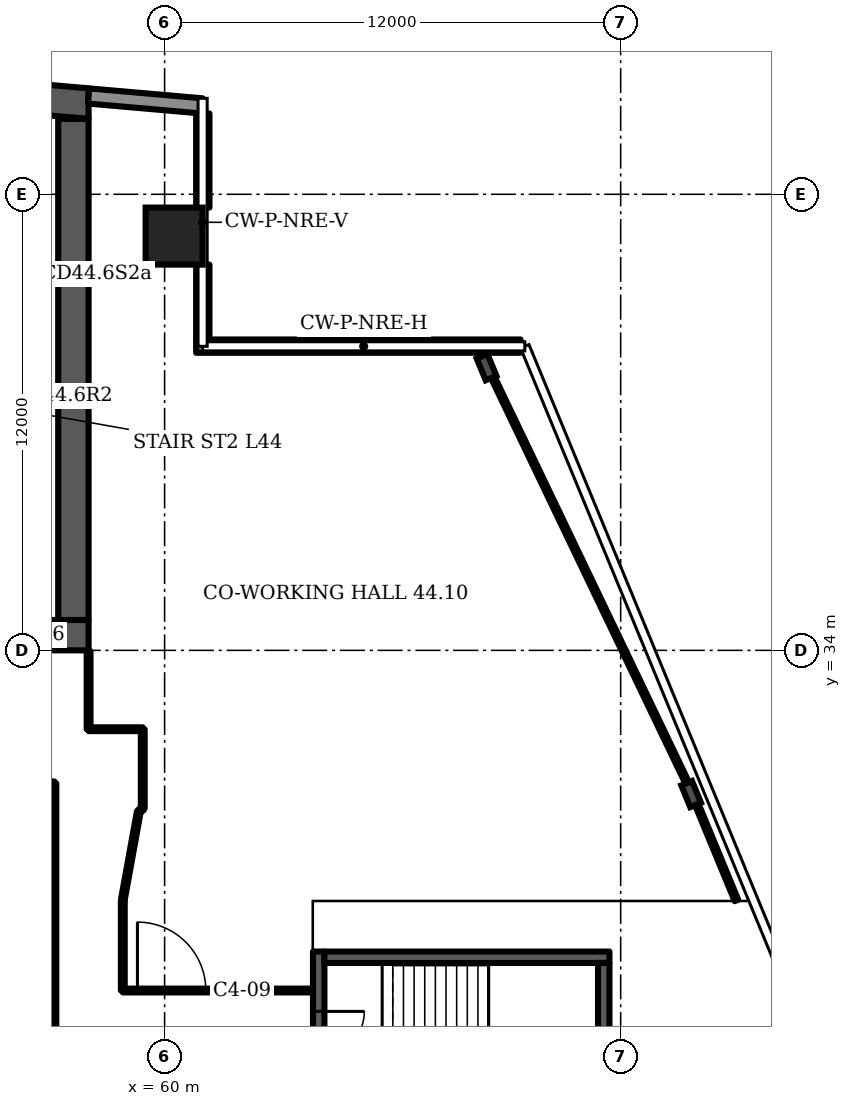
"""IFC4 building model, lengths in metres.
Left out: names, types, materials, properties, quantities, classifications, styles, units other than length and angle.
Written with IfcOpenShell. Run it as: python <this file> out.ifc"""

import sys

from ifc_helpers import new_model, si_unit, direction, frame, frame_2d, origin, origin_2d, place, context, subcontext, project, spatial, polyline, rectangle, i_section, outline, extrude, element, fill, save


model = new_model("IFC4")
c1 = context("Model", 3, precision=1e-05, world=origin(), true_north=direction((0.0, 1.0)))
c2 = subcontext(c1, "Body", "Model", "MODEL_VIEW")
j1 = project(units=[si_unit("LENGTHUNIT", "METRE"), si_unit("PLANEANGLEUNIT", "RADIAN")], contexts=[c1])
p1 = place(None, origin())
s1 = spatial("IfcSite", under=j1, at=p1, CompositionType="ELEMENT")
p2 = place(p1, origin())
s2 = spatial("IfcBuilding", under=s1, at=p2, CompositionType="ELEMENT")
p3 = place(p2, frame((0.0, 0.0, 180.7)))
s3 = spatial("IfcBuildingStorey", under=s2, at=p3, CompositionType="ELEMENT", Elevation=180.7)
p4 = place(p3, origin())
e1 = element("IfcWall", 1, at=p4, inside=s3, PredefinedType="SHEAR", context=c2, shape_type="SweptSolid", body=[
    extrude(outline(polyline([(16.0, 47.984), (37.0, 49.822), (58.0, 47.984), (58.0, 48.787), (37.0, 50.625), (16.0, 48.787), (16.0, 47.984)])), origin(), (0.0, 0.0, 1.0), 3.6),
])
p5 = place(p3, frame((16.0, 34.4, 0.0), z_axis=(0.0, 0.0, 1.0), x_axis=(1.0, 0.0, 0.0)))
e2 = element("IfcWall", 2, at=p5, inside=s3, PredefinedType="SHEAR", context=c2, shape_type="SweptSolid", body=[
    extrude(rectangle(XDim=42.0, YDim=0.8, at=frame_2d((21.0, 0.0))), origin(), (0.0, 0.0, 1.0), 3.6),
])
p6 = place(p5, frame((3.2, 0.0, 0.0)))
e3 = element("IfcOpeningElement", 3, at=p6, cuts=e2, PredefinedType="OPENING", context=c2, shape_type="SweptSolid", body=[
    extrude(rectangle(XDim=1.0, YDim=2.1, at=frame_2d((0.5, 1.05))), frame((0.0, 0.41, 0.0), z_axis=(0.0, -1.0, 0.0), x_axis=(1.0, 0.0, 0.0)), (0.0, 0.0, 1.0), 0.82),
])
p7 = place(p5, frame((7.65, 0.0, 0.0)))
e4 = element("IfcOpeningElement", 4, at=p7, cuts=e2, PredefinedType="OPENING", context=c2, shape_type="SweptSolid", body=[
    extrude(rectangle(XDim=1.2, YDim=2.1, at=frame_2d((0.6, 1.05))), frame((0.0, 0.41, 0.0), z_axis=(0.0, -1.0, 0.0), x_axis=(1.0, 0.0, 0.0)), (0.0, 0.0, 1.0), 0.82),
])
p8 = place(p5, frame((14.767, 0.0, 0.0)))
e5 = element("IfcOpeningElement", 5, at=p8, cuts=e2, PredefinedType="OPENING", context=c2, shape_type="SweptSolid", body=[
    extrude(rectangle(XDim=1.1, YDim=2.1, at=frame_2d((0.55, 1.05))), frame((0.0, 0.41, 0.0), z_axis=(0.0, -1.0, 0.0), x_axis=(1.0, 0.0, 0.0)), (0.0, 0.0, 1.0), 0.82),
])
p9 = place(p5, frame((19.133, 0.0, 0.0)))
e6 = element("IfcOpeningElement", 6, at=p9, cuts=e2, PredefinedType="OPENING", context=c2, shape_type="SweptSolid", body=[
    extrude(rectangle(XDim=1.1, YDim=2.1, at=frame_2d((0.55, 1.05))), frame((0.0, 0.41, 0.0), z_axis=(0.0, -1.0, 0.0), x_axis=(1.0, 0.0, 0.0)), (0.0, 0.0, 1.0), 0.82),
])
p10 = place(p5, frame((16.8, 0.0, 0.0)))
e7 = element("IfcOpeningElement", 7, at=p10, cuts=e2, PredefinedType="OPENING", context=c2, shape_type="SweptSolid", body=[
    extrude(rectangle(XDim=1.4, YDim=2.1, at=frame_2d((0.7, 1.05))), frame((0.0, 0.41, 0.0), z_axis=(0.0, -1.0, 0.0), x_axis=(1.0, 0.0, 0.0)), (0.0, 0.0, 1.0), 0.82),
])
p11 = place(p5, frame((21.767, 0.0, 0.0)))
e8 = element("IfcOpeningElement", 8, at=p11, cuts=e2, PredefinedType="OPENING", context=c2, shape_type="SweptSolid", body=[
    extrude(rectangle(XDim=1.1, YDim=2.1, at=frame_2d((0.55, 1.05))), frame((0.0, 0.41, 0.0), z_axis=(0.0, -1.0, 0.0), x_axis=(1.0, 0.0, 0.0)), (0.0, 0.0, 1.0), 0.82),
])
p12 = place(p5, frame((23.95, 0.0, 0.0)))
e9 = element("IfcOpeningElement", 9, at=p12, cuts=e2, PredefinedType="OPENING", context=c2, shape_type="SweptSolid", body=[
    extrude(rectangle(XDim=1.1, YDim=2.1, at=frame_2d((0.55, 1.05))), frame((0.0, 0.41, 0.0), z_axis=(0.0, -1.0, 0.0), x_axis=(1.0, 0.0, 0.0)), (0.0, 0.0, 1.0), 0.82),
])
p13 = place(p5, frame((26.133, 0.0, 0.0)))
e10 = element("IfcOpeningElement", 10, at=p13, cuts=e2, PredefinedType="OPENING", context=c2, shape_type="SweptSolid", body=[
    extrude(rectangle(XDim=1.1, YDim=2.1, at=frame_2d((0.55, 1.05))), frame((0.0, 0.41, 0.0), z_axis=(0.0, -1.0, 0.0), x_axis=(1.0, 0.0, 0.0)), (0.0, 0.0, 1.0), 0.82),
])
p14 = place(p5, frame((33.15, 0.0, 0.0)))
e11 = element("IfcOpeningElement", 11, at=p14, cuts=e2, PredefinedType="OPENING", context=c2, shape_type="SweptSolid", body=[
    extrude(rectangle(XDim=1.2, YDim=2.1, at=frame_2d((0.6, 1.05))), frame((0.0, 0.41, 0.0), z_axis=(0.0, -1.0, 0.0), x_axis=(1.0, 0.0, 0.0)), (0.0, 0.0, 1.0), 0.82),
])
p15 = place(p5, frame((37.767, 0.0, 0.0)))
e12 = element("IfcOpeningElement", 12, at=p15, cuts=e2, PredefinedType="OPENING", context=c2, shape_type="SweptSolid", body=[
    extrude(rectangle(XDim=1.4, YDim=2.1, at=frame_2d((0.7, 1.05))), frame((0.0, 0.41, 0.0), z_axis=(0.0, -1.0, 0.0), x_axis=(1.0, 0.0, 0.0)), (0.0, 0.0, 1.0), 0.82),
])
p16 = place(p3, frame((57.6, 34.8, 0.0), z_axis=(0.0, 0.0, 1.0), x_axis=(0.0, 1.0, 0.0)))
e13 = element("IfcWall", 13, at=p16, inside=s3, PredefinedType="SHEAR", context=c2, shape_type="SweptSolid", body=[
    extrude(rectangle(XDim=13.184, YDim=0.8, at=frame_2d((6.592, 0.0))), origin(), (0.0, 0.0, 1.0), 3.6),
])
p17 = place(p3, frame((60.25, 44.9, 0.0), z_axis=(0.0, 0.0, 1.0), x_axis=(1.0, 0.0, 0.0)))
e14 = element("IfcColumn", 14, at=p17, inside=s3, PredefinedType="COLUMN", context=c2, shape_type="SweptSolid", body=[
    extrude(rectangle(XDim=1.5, YDim=1.5, at=origin_2d()), origin(), (0.0, 0.0, 1.0), 3.6),
])
for number, where, z_axis, x_axis in (
    (15, (73.854, 30.219, 0.0), (0.0, 0.0, 1.0), (0.924, 0.382, 0.0)),
    (16, (68.472, 41.45, 0.0), (0.0, 0.0, 1.0), (0.924, 0.382, 0.0)),
):
    element("IfcColumn", number, at=place(p3, frame(where, z_axis=z_axis, x_axis=x_axis)), inside=s3, PredefinedType="COLUMN", context=c2, shape_type="SweptSolid", body=[
        extrude(i_section(OverallWidth=0.305, OverallDepth=0.62, WebThickness=0.021, FlangeThickness=0.04, FilletRadius=0.027, at=origin_2d()), origin(), (0.0, 0.0, 1.0), 3.6),
    ])
p18 = place(p3, frame((60.983, 48.326, 0.0), z_axis=(0.0, 0.0, 1.0), x_axis=(-0.996194, 0.087168, 0.0)))
e17 = element("IfcWall", 17, at=p18, inside=s3, PredefinedType="SOLIDWALL", context=c2, shape_type="SweptSolid", body=[
    extrude(rectangle(XDim=2.994, YDim=0.4, at=frame_2d((1.497, 0.0))), origin(), (0.0, 0.0, 1.0), 3.2),
])
p19 = place(p3, frame((69.366, 42.005, 0.0), z_axis=(0.0, 0.0, 1.0), x_axis=(-1.0, 0.0, 0.0)))
e18 = element("IfcWall", 18, at=p19, inside=s3, PredefinedType="SOLIDWALL", context=c2, shape_type="SweptSolid", body=[
    extrude(rectangle(XDim=8.536, YDim=0.35, at=frame_2d((4.268, 0.0))), origin(), (0.0, 0.0, 1.0), 1.0),
])
p20 = place(p3, frame((61.005, 42.18, 0.0), z_axis=(0.0, 0.0, 1.0), x_axis=(0.0, 1.0, 0.0)))
e19 = element("IfcWall", 19, at=p20, inside=s3, PredefinedType="SOLIDWALL", context=c2, shape_type="SweptSolid", body=[
    extrude(rectangle(XDim=1.97, YDim=0.35, at=frame_2d((0.985, 0.0))), origin(), (0.0, 0.0, 1.0), 1.0),
])
p21 = place(p3, frame((61.005, 45.65, 0.0), z_axis=(0.0, 0.0, 1.0), x_axis=(0.0, 1.0, 0.0)))
e20 = element("IfcWall", 20, at=p21, inside=s3, PredefinedType="SOLIDWALL", context=c2, shape_type="SweptSolid", body=[
    extrude(rectangle(XDim=2.477, YDim=0.35, at=frame_2d((1.238, 0.0))), origin(), (0.0, 0.0, 1.0), 1.0),
])
p22 = place(p3, frame((51.4, 40.7, 0.0), z_axis=(0.0, 0.0, 1.0), x_axis=(1.0, 0.0, 0.0)))
e21 = element("IfcWall", 21, at=p22, inside=s3, PredefinedType="PARTITIONING", context=c2, shape_type="SweptSolid", body=[
    extrude(rectangle(XDim=5.8, YDim=0.2, at=frame_2d((2.9, 0.0))), origin(), (0.0, 0.0, 1.0), 3.2),
])
p23 = place(p22, frame((0.367, 0.0, 0.0)))
e22 = element("IfcOpeningElement", 22, at=p23, cuts=e21, PredefinedType="OPENING", context=c2, shape_type="SweptSolid", body=[
    extrude(rectangle(XDim=1.1, YDim=2.1, at=frame_2d((0.55, 1.05))), frame((0.0, 0.11, 0.0), z_axis=(0.0, -1.0, 0.0), x_axis=(1.0, 0.0, 0.0)), (0.0, 0.0, 1.0), 0.22),
])
p24 = place(p22, frame((3.417, 0.0, 0.0)))
e23 = element("IfcOpeningElement", 23, at=p24, cuts=e21, PredefinedType="OPENING", context=c2, shape_type="SweptSolid", body=[
    extrude(rectangle(XDim=1.0, YDim=2.1, at=frame_2d((0.5, 1.05))), frame((0.0, 0.11, 0.0), z_axis=(0.0, -1.0, 0.0), x_axis=(1.0, 0.0, 0.0)), (0.0, 0.0, 1.0), 0.22),
])
p25 = place(p3, frame((51.4, 43.9, 0.0), z_axis=(0.0, 0.0, 1.0), x_axis=(1.0, 0.0, 0.0)))
e24 = element("IfcWall", 24, at=p25, inside=s3, PredefinedType="PARTITIONING", context=c2, shape_type="SweptSolid", body=[
    extrude(rectangle(XDim=5.8, YDim=0.2, at=frame_2d((2.9, 0.0))), origin(), (0.0, 0.0, 1.0), 3.2),
])
p26 = place(p25, frame((2.283, 0.0, 0.0)))
e25 = element("IfcOpeningElement", 25, at=p26, cuts=e24, PredefinedType="OPENING", context=c2, shape_type="SweptSolid", body=[
    extrude(rectangle(XDim=1.0, YDim=2.1, at=frame_2d((0.5, 1.05))), frame((0.0, 0.11, 0.0), z_axis=(0.0, -1.0, 0.0), x_axis=(1.0, 0.0, 0.0)), (0.0, 0.0, 1.0), 0.22),
])
p27 = place(p25, frame((4.167, 0.0, 0.0)))
e26 = element("IfcOpeningElement", 26, at=p27, cuts=e24, PredefinedType="OPENING", context=c2, shape_type="SweptSolid", body=[
    extrude(rectangle(XDim=1.0, YDim=2.1, at=frame_2d((0.5, 1.05))), frame((0.0, 0.11, 0.0), z_axis=(0.0, -1.0, 0.0), x_axis=(1.0, 0.0, 0.0)), (0.0, 0.0, 1.0), 0.22),
])
p28 = place(p3, frame((64.055, 21.725, 0.0), z_axis=(0.0, 0.0, 1.0), x_axis=(0.0, 1.0, 0.0)))
e27 = element("IfcWall", 27, at=p28, inside=s3, PredefinedType="SHEAR", context=c2, shape_type="SweptSolid", body=[
    extrude(rectangle(XDim=4.35, YDim=0.3, at=frame_2d((2.175, 0.0))), origin(), (0.0, 0.0, 1.0), 3.2),
])
p29 = place(p28, frame((1.575, 0.0, 0.0)))
e28 = element("IfcOpeningElement", 28, at=p29, cuts=e27, PredefinedType="OPENING", context=c2, shape_type="SweptSolid", body=[
    extrude(rectangle(XDim=1.2, YDim=2.1, at=frame_2d((0.6, 1.05))), frame((0.0, 0.16, 0.0), z_axis=(0.0, -1.0, 0.0), x_axis=(1.0, 0.0, 0.0)), (0.0, 0.0, 1.0), 0.32),
])
p30 = place(p3, frame((57.1, 11.985, 0.0), z_axis=(0.0, 0.0, 1.0), x_axis=(0.0, 1.0, 0.0)))
e29 = element("IfcWall", 29, at=p30, inside=s3, PredefinedType="PARTITIONING", context=c2, shape_type="SweptSolid", body=[
    extrude(rectangle(XDim=18.515, YDim=0.1, at=frame_2d((9.257, 0.0))), origin(), (0.0, 0.0, 1.0), 3.2),
])
p31 = place(p30, frame((8.295, 0.0, 0.0)))
e30 = element("IfcOpeningElement", 30, at=p31, cuts=e29, PredefinedType="OPENING", context=c2, shape_type="SweptSolid", body=[
    extrude(rectangle(XDim=1.8, YDim=2.1, at=frame_2d((0.9, 1.05))), frame((0.0, 0.06, 0.0), z_axis=(0.0, -1.0, 0.0), x_axis=(1.0, 0.0, 0.0)), (0.0, 0.0, 1.0), 0.12),
])
p32 = place(p3, frame((58.0, 31.925, 0.0), z_axis=(0.0, 0.0, 1.0), x_axis=(0.0, 1.0, 0.0)))
e31 = element("IfcWall", 31, at=p32, inside=s3, PredefinedType="PARTITIONING", context=c2, shape_type="SweptSolid", body=[
    extrude(rectangle(XDim=2.055, YDim=0.1, at=frame_2d((1.027, 0.0))), origin(), (0.0, 0.0, 1.0), 3.2),
])
p33 = place(p3, frame((58.0, 31.925, 0.0), z_axis=(0.0, 0.0, 1.0), x_axis=(1.0, 0.0, 0.0)))
e32 = element("IfcWall", 32, at=p33, inside=s3, PredefinedType="PARTITIONING", context=c2, shape_type="SweptSolid", body=[
    extrude(rectangle(XDim=1.425, YDim=0.1, at=frame_2d((0.712, 0.0))), origin(), (0.0, 0.0, 1.0), 3.2),
])
p34 = place(p3, frame((58.9, 25.05, 0.0), z_axis=(0.0, 0.0, 1.0), x_axis=(0.0, 1.0, 0.0)))
e33 = element("IfcWall", 33, at=p34, inside=s3, PredefinedType="PARTITIONING", context=c2, shape_type="SweptSolid", body=[
    extrude(rectangle(XDim=2.385, YDim=0.1, at=frame_2d((1.192, 0.0))), origin(), (0.0, 0.0, 1.0), 3.2),
])
p35 = place(p3, frame((58.9, 25.05, 0.0), z_axis=(0.0, 0.0, 1.0), x_axis=(1.0, 0.0, 0.0)))
e34 = element("IfcWall", 34, at=p35, inside=s3, PredefinedType="PARTITIONING", context=c2, shape_type="SweptSolid", body=[
    extrude(rectangle(XDim=4.985, YDim=0.1, at=frame_2d((2.492, 0.0))), origin(), (0.0, 0.0, 1.0), 3.2),
])
p36 = place(p35, frame((0.385, 0.0, 0.0)))
e35 = element("IfcOpeningElement", 35, at=p36, cuts=e34, PredefinedType="OPENING", context=c2, shape_type="SweptSolid", body=[
    extrude(rectangle(XDim=1.8, YDim=2.1, at=frame_2d((0.9, 1.05))), frame((0.0, 0.06, 0.0), z_axis=(0.0, -1.0, 0.0), x_axis=(1.0, 0.0, 0.0)), (0.0, 0.0, 1.0), 0.12),
])
p37 = place(p3, frame((58.9, 27.435, 0.0), z_axis=(0.0, 0.0, 1.0), x_axis=(0.178584, 0.983924, 0.0)))
e36 = element("IfcWall", 36, at=p37, inside=s3, PredefinedType="PARTITIONING", context=c2, shape_type="SweptSolid", body=[
    extrude(rectangle(XDim=2.353, YDim=0.1, at=frame_2d((1.176, 0.0))), origin(), (0.0, 0.0, 1.0), 3.2),
])
p38 = place(p3, frame((59.32, 29.75, 0.0), z_axis=(0.0, 0.0, 1.0), x_axis=(0.741581, 0.670872, 0.0)))
e37 = element("IfcWall", 37, at=p38, inside=s3, PredefinedType="PARTITIONING", context=c2, shape_type="SweptSolid", body=[
    extrude(rectangle(XDim=0.142, YDim=0.1, at=frame_2d((0.071, 0.0))), origin(), (0.0, 0.0, 1.0), 3.2),
])
p39 = place(p3, frame((59.425, 29.845, 0.0), z_axis=(0.0, 0.0, 1.0), x_axis=(0.0, 1.0, 0.0)))
e38 = element("IfcWall", 38, at=p39, inside=s3, PredefinedType="PARTITIONING", context=c2, shape_type="SweptSolid", body=[
    extrude(rectangle(XDim=2.08, YDim=0.1, at=frame_2d((1.04, 0.0))), origin(), (0.0, 0.0, 1.0), 3.2),
])
p40 = place(p3, frame((73.885, 30.23, 0.0), z_axis=(0.0, 0.0, 1.0), x_axis=(-0.432221, 0.901772, 0.0)))
e39 = element("IfcWall", 39, at=p40, inside=s3, PredefinedType="PARTITIONING", context=c2, shape_type="SweptSolid", body=[
    extrude(rectangle(XDim=12.459, YDim=0.1, at=frame_2d((6.229, 0.0))), origin(), (0.0, 0.0, 1.0), 2.58),
])
p41 = place(p3, frame((75.047, 27.42, 0.0), z_axis=(0.0, 0.0, 1.0), x_axis=(-0.382024, 0.924148, 0.0)))
e40 = element("IfcWall", 40, at=p41, inside=s3, PredefinedType="PARTITIONING", context=c2, shape_type="SweptSolid", body=[
    extrude(rectangle(XDim=3.041, YDim=0.1, at=frame_2d((1.521, 0.0))), origin(), (0.0, 0.0, 1.0), 2.58),
])
p42 = place(p3, frame((44.15, 30.5, 0.0), z_axis=(0.0, 0.0, 1.0), x_axis=(1.0, 0.0, 0.0)))
e41 = element("IfcWall", 41, at=p42, inside=s3, PredefinedType="PARTITIONING", context=c2, shape_type="SweptSolid", body=[
    extrude(rectangle(XDim=12.95, YDim=0.1, at=frame_2d((6.475, 0.0))), origin(), (0.0, 0.0, 1.0), 3.2),
])
p43 = place(p42, frame((3.17, 0.0, 0.0)))
e42 = element("IfcOpeningElement", 42, at=p43, cuts=e41, PredefinedType="OPENING", context=c2, shape_type="SweptSolid", body=[
    extrude(rectangle(XDim=1.8, YDim=2.1, at=frame_2d((0.9, 1.05))), frame((0.0, 0.06, 0.0), z_axis=(0.0, -1.0, 0.0), x_axis=(1.0, 0.0, 0.0)), (0.0, 0.0, 1.0), 0.12),
])
p44 = place(p3, frame((64.205, 25.925, 0.0), z_axis=(0.0, 0.0, 1.0), x_axis=(1.0, 0.0, 0.0)))
e43 = element("IfcWall", 43, at=p44, inside=s3, PredefinedType="SHEAR", context=c2, shape_type="SweptSolid", body=[
    extrude(rectangle(XDim=7.5, YDim=0.3, at=frame_2d((3.75, 0.0))), origin(), (0.0, 0.0, 1.0), 3.2),
])
p45 = place(p3, frame((71.555, 22.025, 0.0), z_axis=(0.0, 0.0, 1.0), x_axis=(0.0, 1.0, 0.0)))
e44 = element("IfcWall", 44, at=p45, inside=s3, PredefinedType="SHEAR", context=c2, shape_type="SweptSolid", body=[
    extrude(rectangle(XDim=3.75, YDim=0.3, at=frame_2d((1.875, 0.0))), origin(), (0.0, 0.0, 1.0), 3.2),
])
p46 = place(p29, origin())
e45 = element("IfcDoor", 45, at=p46, inside=s3, OperationType="SINGLE_SWING_RIGHT", PredefinedType="DOOR", context=c2, shape_type="SweptSolid", body=[
    extrude(rectangle(XDim=1.2, YDim=2.1, at=frame_2d((0.6, 1.05))), frame((0.0, 0.025, 0.0), z_axis=(0.0, -1.0, 0.0), x_axis=(1.0, 0.0, 0.0)), (0.0, 0.0, 1.0), 0.05),
])
fill(e28, e45)
p47 = place(p36, origin())
e46 = element("IfcDoor", 46, at=p47, inside=s3, OperationType="DOUBLE_DOOR_SINGLE_SWING", PredefinedType="DOOR", context=c2, shape_type="SweptSolid", body=[
    extrude(rectangle(XDim=1.8, YDim=2.1, at=frame_2d((0.9, 1.05))), frame((0.0, 0.025, 0.0), z_axis=(0.0, -1.0, 0.0), x_axis=(1.0, 0.0, 0.0)), (0.0, 0.0, 1.0), 0.05),
])
fill(e35, e46)
save(model, sys.argv[1])
